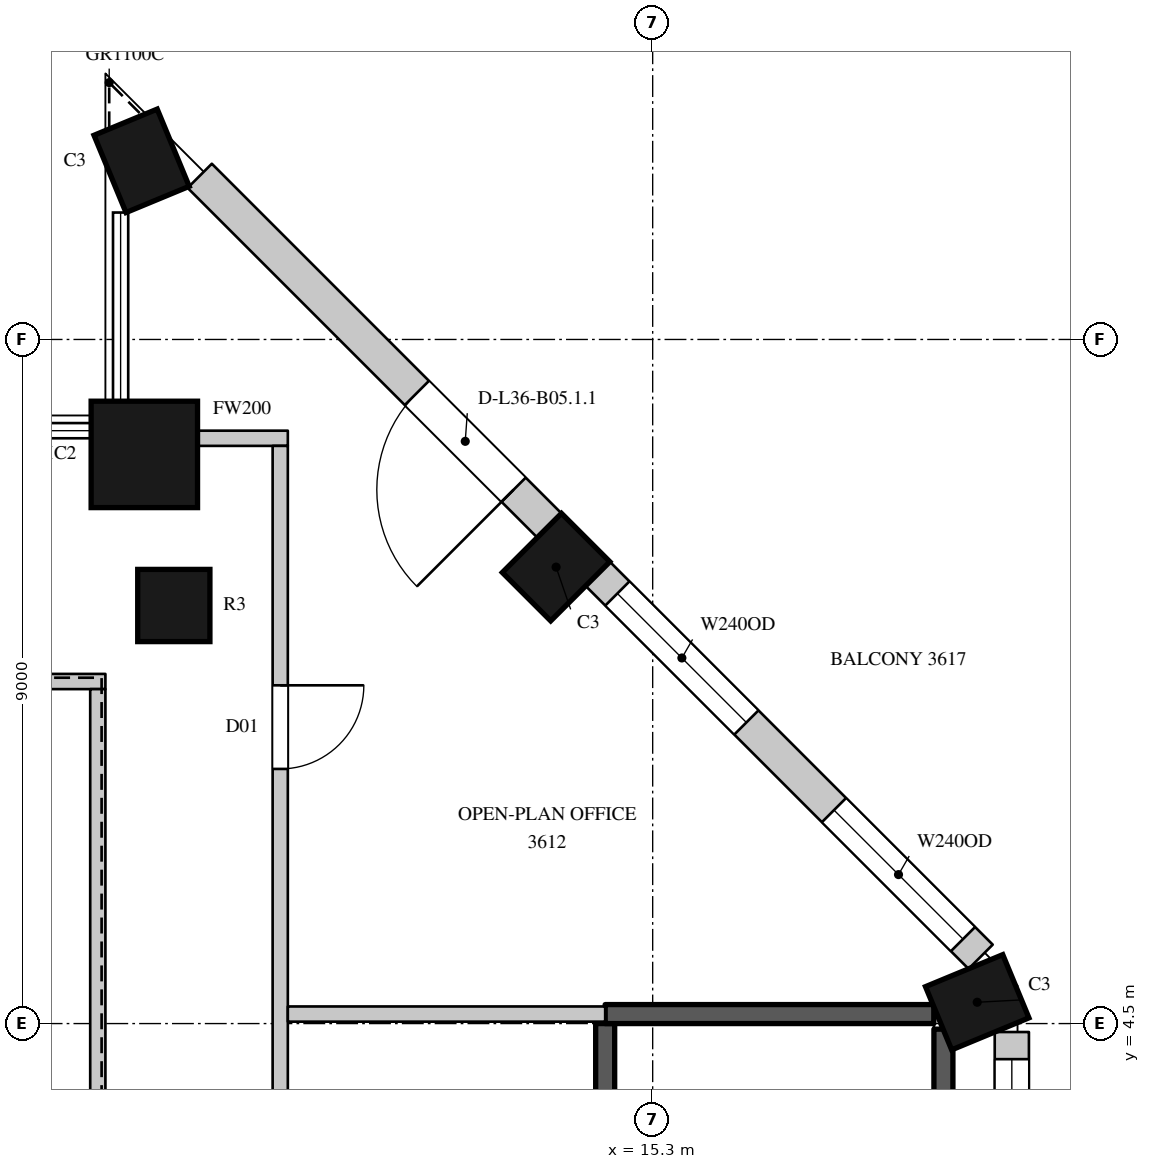
"""IFC4 building model, lengths in metres.
Left out: names, types, materials, properties, quantities, classifications, styles, units other than length and angle.
Written with IfcOpenShell. Run it as: python <this file> out.ifc"""

import sys

from ifc_helpers import new_model, si_unit, direction, frame, frame_2d, origin, origin_2d, place, context, subcontext, project, spatial, rectangle, circle, extrude, element, fill, save


model = new_model("IFC4")
c1 = context("Model", 3, precision=1e-05, world=origin(), true_north=direction((0.0, 1.0)))
c2 = subcontext(c1, "Body", "Model", "MODEL_VIEW")
j1 = project(units=[si_unit("LENGTHUNIT", "METRE"), si_unit("PLANEANGLEUNIT", "RADIAN")], contexts=[c1])
p1 = place(None, origin())
s1 = spatial("IfcSite", under=j1, at=p1, CompositionType="ELEMENT")
p2 = place(p1, origin())
s2 = spatial("IfcBuilding", under=s1, at=p2, CompositionType="ELEMENT")
p3 = place(p2, frame((0.0, 0.0, 168.7)))
s3 = spatial("IfcBuildingStorey", under=s2, at=p3, CompositionType="ELEMENT", Elevation=168.7)
for number, where, z_axis, x_axis in (
    (1, (19.57, 4.78, 0.0), (0.0, 0.0, 1.0), (-0.383, 0.924, 0.0)),
    (2, (14.029, 10.505, 0.0), (0.0, 0.0, 1.0), (-0.707, 0.707, 0.0)),
    (3, (8.576, 15.85, 0.0), (0.0, 0.0, 1.0), (-0.924, -0.383, 0.0)),
):
    element("IfcColumn", number, at=place(p3, frame(where, z_axis=z_axis, x_axis=x_axis)), inside=s3, PredefinedType="COLUMN", context=c2, shape_type="SweptSolid", body=[
        extrude(rectangle(XDim=0.9, YDim=1.1, at=origin_2d()), origin(), (0.0, 0.0, 1.0), 4.1),
    ])
p4 = place(p3, frame((8.612, 11.988, 0.0), z_axis=(0.0, 0.0, 1.0), x_axis=(1.0, 0.0, 0.0)))
e4 = element("IfcColumn", 4, at=p4, inside=s3, PredefinedType="COLUMN", context=c2, shape_type="SweptSolid", body=[
    extrude(circle(Radius=0.7, at=origin_2d()), origin(), (0.0, 0.0, 1.0), 4.1),
])
p5 = place(p3, frame((9.0, 10.0, 0.0), z_axis=(0.0, 0.0, 1.0), x_axis=(1.0, 0.0, 0.0)))
e5 = element("IfcColumn", 5, at=p5, inside=s3, PredefinedType="COLUMN", context=c2, shape_type="SweptSolid", body=[
    extrude(circle(Radius=0.475, at=origin_2d()), origin(), (0.0, 0.0, 1.0), 4.1),
])
p6 = place(p3, frame((20.025, -4.05, 0.0), z_axis=(0.0, 0.0, 1.0), x_axis=(0.0, 1.0, 0.0)))
e6 = element("IfcWall", 6, at=p6, inside=s3, PredefinedType="SOLIDWALL", context=c2, shape_type="SweptSolid", body=[
    extrude(rectangle(XDim=8.439, YDim=0.45, at=frame_2d((4.219, 0.0))), origin(), (0.0, 0.0, 1.0), 3.8),
])
p7 = place(p6, frame((0.394, 0.0, 1.05)))
e7 = element("IfcOpeningElement", 7, at=p7, cuts=e6, PredefinedType="OPENING", context=c2, shape_type="SweptSolid", body=[
    extrude(rectangle(XDim=3.0, YDim=2.4, at=frame_2d((1.5, 1.2))), frame((0.0, 0.235, 0.0), z_axis=(0.0, -1.0, 0.0), x_axis=(1.0, 0.0, 0.0)), (0.0, 0.0, 1.0), 0.47),
])
p8 = place(p6, frame((5.082, 0.0, 1.05)))
e8 = element("IfcOpeningElement", 8, at=p8, cuts=e6, PredefinedType="OPENING", context=c2, shape_type="SweptSolid", body=[
    extrude(rectangle(XDim=3.0, YDim=2.4, at=frame_2d((1.5, 1.2))), frame((0.0, 0.235, 0.0), z_axis=(0.0, -1.0, 0.0), x_axis=(1.0, 0.0, 0.0)), (0.0, 0.0, 1.0), 0.47),
])
p9 = place(p3, frame((19.615, 5.379, 0.0), z_axis=(0.0, 0.0, 1.0), x_axis=(-0.707089646058, 0.7071239159, 0.0)))
e9 = element("IfcWall", 9, at=p9, inside=s3, PredefinedType="SOLIDWALL", context=c2, shape_type="SweptSolid", body=[
    extrude(rectangle(XDim=7.124, YDim=0.45, at=frame_2d((3.562, 0.0))), origin(), (0.0, 0.0, 1.0), 3.8),
])
p10 = place(p9, frame((0.328, 0.0, 1.05)))
e10 = element("IfcOpeningElement", 10, at=p10, cuts=e9, PredefinedType="OPENING", context=c2, shape_type="SweptSolid", body=[
    extrude(rectangle(XDim=2.4, YDim=2.4, at=frame_2d((1.2, 1.2))), frame((0.0, 0.235, 0.0), z_axis=(0.0, -1.0, 0.0), x_axis=(1.0, 0.0, 0.0)), (0.0, 0.0, 1.0), 0.47),
])
p11 = place(p9, frame((4.359, 0.0, 1.05)))
e11 = element("IfcOpeningElement", 11, at=p11, cuts=e9, PredefinedType="OPENING", context=c2, shape_type="SweptSolid", body=[
    extrude(rectangle(XDim=2.4, YDim=2.4, at=frame_2d((1.2, 1.2))), frame((0.0, 0.235, 0.0), z_axis=(0.0, -1.0, 0.0), x_axis=(1.0, 0.0, 0.0)), (0.0, 0.0, 1.0), 0.47),
])
p12 = place(p3, frame((13.941, 11.053, 0.0), z_axis=(0.0, 0.0, 1.0), x_axis=(-0.707106781187, 0.707106781187, 0.0)))
e12 = element("IfcWall", 12, at=p12, inside=s3, PredefinedType="SOLIDWALL", context=c2, shape_type="SweptSolid", body=[
    extrude(rectangle(XDim=6.505, YDim=0.45, at=frame_2d((3.252, 0.0))), origin(), (0.0, 0.0, 1.0), 3.8),
])
p13 = place(p12, frame((0.665, 0.0, 0.0)))
e13 = element("IfcOpeningElement", 13, at=p13, cuts=e12, PredefinedType="OPENING", context=c2, shape_type="SweptSolid", body=[
    extrude(rectangle(XDim=1.8, YDim=2.4, at=frame_2d((0.9, 1.2))), frame((0.0, 0.235, 0.0), z_axis=(0.0, -1.0, 0.0), x_axis=(1.0, 0.0, 0.0)), (0.0, 0.0, 1.0), 0.47),
])
p14 = place(p3, frame((18.65, 7.864, 0.0), z_axis=(0.0, 0.0, 1.0), x_axis=(-0.707059037574, 0.707154521576, 0.0)))
e14 = element("IfcWall", 14, at=p14, inside=s3, PredefinedType="SOLIDWALL", context=c2, shape_type="SweptSolid", body=[
    extrude(rectangle(XDim=2.557, YDim=0.45, at=frame_2d((1.278, 0.0))), origin(), (0.0, 0.0, 1.0), 0.6),
])
p15 = place(p3, frame((16.206, 10.308, 0.0), z_axis=(0.0, 0.0, 1.0), x_axis=(-0.707057827829, 0.707155731156, 0.0)))
e15 = element("IfcWall", 15, at=p15, inside=s3, PredefinedType="SOLIDWALL", context=c2, shape_type="SweptSolid", body=[
    extrude(rectangle(XDim=2.494, YDim=0.45, at=frame_2d((1.247, 0.0))), origin(), (0.0, 0.0, 1.0), 0.6),
])
p16 = place(p3, frame((12.251, 14.263, 0.0), z_axis=(0.0, 0.0, 1.0), x_axis=(-0.707039709166, 0.707173846846, 0.0)))
e16 = element("IfcWall", 16, at=p16, inside=s3, PredefinedType="SOLIDWALL", context=c2, shape_type="SweptSolid", body=[
    extrude(rectangle(XDim=1.82, YDim=0.45, at=frame_2d((0.91, 0.0))), origin(), (0.0, 0.0, 1.0), 0.6),
])
p17 = place(p3, frame((-6.1, 9.0, 0.0), z_axis=(0.0, 0.0, 1.0), x_axis=(1.0, 0.0, 0.0)))
e17 = element("IfcWall", 17, at=p17, inside=s3, PredefinedType="PARTITIONING", context=c2, shape_type="SweptSolid", body=[
    extrude(rectangle(XDim=14.2, YDim=0.2, at=frame_2d((7.1, 0.0))), origin(), (0.0, 0.0, 1.0), 3.8),
])
p18 = place(p3, frame((8.0, -1.78, 0.0), z_axis=(0.0, 0.0, 1.0), x_axis=(0.0, 1.0, 0.0)))
e18 = element("IfcWall", 18, at=p18, inside=s3, PredefinedType="PARTITIONING", context=c2, shape_type="SweptSolid", body=[
    extrude(rectangle(XDim=10.68, YDim=0.2, at=frame_2d((5.34, 0.0))), origin(), (0.0, 0.0, 1.0), 3.8),
])
p19 = place(p3, frame((9.296, 12.2, 0.0), z_axis=(0.0, 0.0, 1.0), x_axis=(1.0, 0.0, 0.0)))
e19 = element("IfcWall", 19, at=p19, inside=s3, PredefinedType="PARTITIONING", context=c2, shape_type="SweptSolid", body=[
    extrude(rectangle(XDim=1.204, YDim=0.2, at=frame_2d((0.602, 0.0))), origin(), (0.0, 0.0, 1.0), 3.8),
])
p20 = place(p3, frame((10.4, -11.4, 0.0), z_axis=(0.0, 0.0, 1.0), x_axis=(0.0, 1.0, 0.0)))
e20 = element("IfcWall", 20, at=p20, inside=s3, PredefinedType="PARTITIONING", context=c2, shape_type="SweptSolid", body=[
    extrude(rectangle(XDim=23.5, YDim=0.2, at=frame_2d((11.75, 0.0))), origin(), (0.0, 0.0, 1.0), 3.8),
])
p21 = place(p20, frame((12.1, 0.0, 0.0)))
e21 = element("IfcOpeningElement", 21, at=p21, cuts=e20, PredefinedType="OPENING", context=c2, shape_type="SweptSolid", body=[
    extrude(rectangle(XDim=1.5, YDim=2.4, at=frame_2d((0.75, 1.2))), frame((0.0, 0.11, 0.0), z_axis=(0.0, -1.0, 0.0), x_axis=(1.0, 0.0, 0.0)), (0.0, 0.0, 1.0), 0.22),
])
p22 = place(p20, frame((19.25, 0.0, 0.0)))
e22 = element("IfcOpeningElement", 22, at=p22, cuts=e20, PredefinedType="OPENING", context=c2, shape_type="SweptSolid", body=[
    extrude(rectangle(XDim=1.1, YDim=2.4, at=frame_2d((0.55, 1.2))), frame((0.0, 0.11, 0.0), z_axis=(0.0, -1.0, 0.0), x_axis=(1.0, 0.0, 0.0)), (0.0, 0.0, 1.0), 0.22),
])
p23 = place(p20, frame((4.45, 0.0, 0.0)))
e23 = element("IfcOpeningElement", 23, at=p23, cuts=e20, PredefinedType="OPENING", context=c2, shape_type="SweptSolid", body=[
    extrude(rectangle(XDim=1.1, YDim=2.4, at=frame_2d((0.55, 1.2))), frame((0.0, 0.11, 0.0), z_axis=(0.0, -1.0, 0.0), x_axis=(1.0, 0.0, 0.0)), (0.0, 0.0, 1.0), 0.22),
])
p24 = place(p3, frame((10.5, 4.625, 0.0), z_axis=(0.0, 0.0, 1.0), x_axis=(1.0, 0.0, 0.0)))
e24 = element("IfcWall", 24, at=p24, inside=s3, PredefinedType="PARTITIONING", context=c2, shape_type="SweptSolid", body=[
    extrude(rectangle(XDim=4.175, YDim=0.2, at=frame_2d((2.087, 0.0))), origin(), (0.0, 0.0, 1.0), 3.8),
])
p25 = place(p3, frame((14.675, -4.5, 0.0), z_axis=(0.0, 0.0, 1.0), x_axis=(0.0, 1.0, 0.0)))
e25 = element("IfcWall", 25, at=p25, inside=s3, PredefinedType="SHEAR", context=c2, shape_type="SweptSolid", body=[
    extrude(rectangle(XDim=9.0, YDim=0.25, at=frame_2d((4.5, 0.0))), origin(), (0.0, 0.0, 1.0), 3.8),
])
p26 = place(p25, frame((0.45, 0.0, 0.0)))
e26 = element("IfcOpeningElement", 26, at=p26, cuts=e25, PredefinedType="OPENING", context=c2, shape_type="SweptSolid", body=[
    extrude(rectangle(XDim=1.1, YDim=2.2, at=frame_2d((0.55, 1.1))), frame((0.0, 0.135, 0.0), z_axis=(0.0, -1.0, 0.0), x_axis=(1.0, 0.0, 0.0)), (0.0, 0.0, 1.0), 0.27),
])
p27 = place(p3, frame((14.675, 4.625, 0.0), z_axis=(0.0, 0.0, 1.0), x_axis=(1.0, 0.0, 0.0)))
e27 = element("IfcWall", 27, at=p27, inside=s3, PredefinedType="SHEAR", context=c2, shape_type="SweptSolid", body=[
    extrude(rectangle(XDim=4.324, YDim=0.25, at=frame_2d((2.162, 0.0))), origin(), (0.0, 0.0, 1.0), 3.8),
])
p28 = place(p3, frame((19.125, -4.05, 0.0), z_axis=(0.0, 0.0, 1.0), x_axis=(0.0, 1.0, 0.0)))
e28 = element("IfcWall", 28, at=p28, inside=s3, PredefinedType="SHEAR", context=c2, shape_type="SweptSolid", body=[
    extrude(rectangle(XDim=8.477, YDim=0.25, at=frame_2d((4.238, 0.0))), origin(), (0.0, 0.0, 1.0), 3.8),
])
p29 = place(p8, origin())
e29 = element("IfcWindow", 29, at=p29, inside=s3, PartitioningType="SINGLE_PANEL", PredefinedType="WINDOW", context=c2, shape_type="SweptSolid", body=[
    extrude(rectangle(XDim=3.0, YDim=2.4, at=frame_2d((1.5, 1.2))), frame((0.0, 0.135, 0.0), z_axis=(0.0, -1.0, 0.0), x_axis=(1.0, 0.0, 0.0)), (0.0, 0.0, 1.0), 0.06),
])
fill(e8, e29)
p30 = place(p10, origin())
e30 = element("IfcWindow", 30, at=p30, inside=s3, PartitioningType="SINGLE_PANEL", PredefinedType="WINDOW", context=c2, shape_type="SweptSolid", body=[
    extrude(rectangle(XDim=2.4, YDim=2.4, at=frame_2d((1.2, 1.2))), frame((0.0, 0.135, 0.0), z_axis=(0.0, -1.0, 0.0), x_axis=(1.0, 0.0, 0.0)), (0.0, 0.0, 1.0), 0.06),
])
fill(e10, e30)
p31 = place(p11, origin())
e31 = element("IfcWindow", 31, at=p31, inside=s3, PartitioningType="SINGLE_PANEL", PredefinedType="WINDOW", context=c2, shape_type="SweptSolid", body=[
    extrude(rectangle(XDim=2.4, YDim=2.4, at=frame_2d((1.2, 1.2))), frame((0.0, 0.135, 0.0), z_axis=(0.0, -1.0, 0.0), x_axis=(1.0, 0.0, 0.0)), (0.0, 0.0, 1.0), 0.06),
])
fill(e11, e31)
p32 = place(p13, origin())
e32 = element("IfcDoor", 32, at=p32, inside=s3, OperationType="SLIDING_TO_LEFT", PredefinedType="DOOR", context=c2, shape_type="SweptSolid", body=[
    extrude(rectangle(XDim=1.8, YDim=2.4, at=frame_2d((0.9, 1.2))), frame((0.0, 0.13, 0.0), z_axis=(0.0, -1.0, 0.0), x_axis=(1.0, 0.0, 0.0)), (0.0, 0.0, 1.0), 0.05),
])
fill(e13, e32)
p33 = place(p22, origin())
e33 = element("IfcDoor", 33, at=p33, inside=s3, OperationType="SINGLE_SWING_LEFT", PredefinedType="DOOR", context=c2, shape_type="SweptSolid", body=[
    extrude(rectangle(XDim=1.1, YDim=2.4, at=frame_2d((0.55, 1.2))), frame((0.0, 0.025, 0.0), z_axis=(0.0, -1.0, 0.0), x_axis=(1.0, 0.0, 0.0)), (0.0, 0.0, 1.0), 0.05),
])
fill(e22, e33)
save(model, sys.argv[1])
